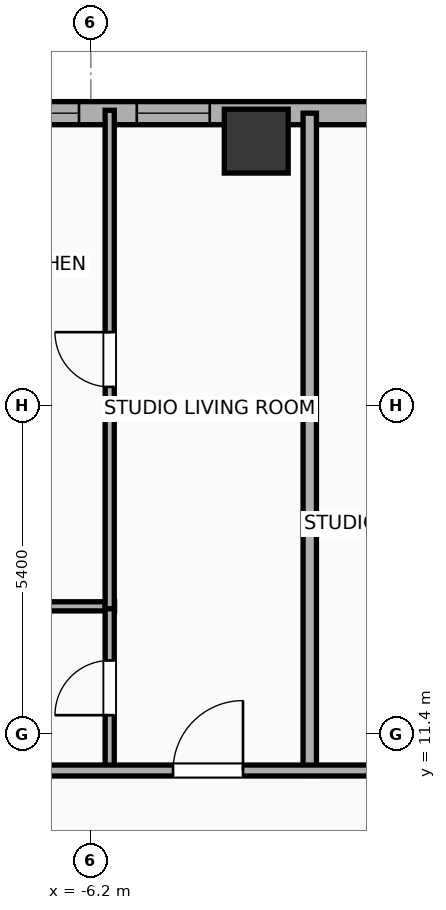
"""IFC4 building model, lengths in metres.
Left out: names, types, materials, properties, quantities, classifications, styles, units other than length and angle.
Written with IfcOpenShell. Run it as: python <this file> out.ifc"""

import sys

from ifc_helpers import new_model, si_unit, direction, frame, frame_2d, origin, origin_2d, place, context, subcontext, project, spatial, rectangle, hollow_rectangle, extrude, element, fill, save


model = new_model("IFC4")
c1 = context("Model", 3, precision=1e-05, world=origin(), true_north=direction((0.0, 1.0)))
c2 = subcontext(c1, "Body", "Model", "MODEL_VIEW")
j1 = project(units=[si_unit("LENGTHUNIT", "METRE"), si_unit("PLANEANGLEUNIT", "RADIAN")], contexts=[c1])
p1 = place(None, origin())
s1 = spatial("IfcSite", under=j1, at=p1, CompositionType="ELEMENT")
p2 = place(p1, origin())
s2 = spatial("IfcBuilding", under=s1, at=p2, CompositionType="ELEMENT")
p3 = place(p2, frame((0.0, 0.0, 132.6)))
s3 = spatial("IfcBuildingStorey", under=s2, at=p3, CompositionType="ELEMENT", Elevation=132.6)
p4 = place(p3, frame((-3.48, 21.15, 0.0), z_axis=(0.0, 0.0, 1.0), x_axis=(1.0, 0.0, 0.0)))
e1 = element("IfcColumn", 1, at=p4, inside=s3, PredefinedType="COLUMN", context=c2, shape_type="SweptSolid", body=[
    extrude(hollow_rectangle(XDim=1.05, YDim=1.05, WallThickness=0.036, at=origin_2d()), origin(), (0.0, 0.0, 1.0), 3.9),
])
p5 = place(p3, frame((-25.381, 21.61, 0.0), z_axis=(0.0, 0.0, 1.0), x_axis=(1.0, 0.0, 0.0)))
e2 = element("IfcWall", 2, at=p5, inside=s3, PredefinedType="ELEMENTEDWALL", context=c2, shape_type="SweptSolid", body=[
    extrude(rectangle(XDim=54.763, YDim=0.38, at=frame_2d((27.381, 0.0))), origin(), (0.0, 0.0, 1.0), 3.65),
])
p6 = place(p5, frame((5.645, 0.0, 0.75)))
e3 = element("IfcOpeningElement", 3, at=p6, cuts=e2, PredefinedType="OPENING", context=c2, shape_type="SweptSolid", body=[
    extrude(rectangle(XDim=2.4, YDim=2.1, at=frame_2d((1.2, 1.05))), frame((0.0, 0.2, 0.0), z_axis=(0.0, -1.0, 0.0), x_axis=(1.0, 0.0, 0.0)), (0.0, 0.0, 1.0), 0.4),
])
p7 = place(p5, frame((45.067, 0.0, 0.75)))
e4 = element("IfcOpeningElement", 4, at=p7, cuts=e2, PredefinedType="OPENING", context=c2, shape_type="SweptSolid", body=[
    extrude(rectangle(XDim=2.4, YDim=2.1, at=frame_2d((1.2, 1.05))), frame((0.0, 0.2, 0.0), z_axis=(0.0, -1.0, 0.0), x_axis=(1.0, 0.0, 0.0)), (0.0, 0.0, 1.0), 0.4),
])
p8 = place(p5, frame((1.831, 0.0, 0.75)))
e5 = element("IfcOpeningElement", 5, at=p8, cuts=e2, PredefinedType="OPENING", context=c2, shape_type="SweptSolid", body=[
    extrude(rectangle(XDim=1.2, YDim=2.05, at=frame_2d((0.6, 1.025))), frame((0.0, 0.2, 0.0), z_axis=(0.0, -1.0, 0.0), x_axis=(1.0, 0.0, 0.0)), (0.0, 0.0, 1.0), 0.4),
])
p9 = place(p5, frame((8.996, 0.0, 0.75)))
e6 = element("IfcOpeningElement", 6, at=p9, cuts=e2, PredefinedType="OPENING", context=c2, shape_type="SweptSolid", body=[
    extrude(rectangle(XDim=1.2, YDim=2.05, at=frame_2d((0.6, 1.025))), frame((0.0, 0.2, 0.0), z_axis=(0.0, -1.0, 0.0), x_axis=(1.0, 0.0, 0.0)), (0.0, 0.0, 1.0), 0.4),
])
p10 = place(p5, frame((15.102, 0.0, 0.75)))
e7 = element("IfcOpeningElement", 7, at=p10, cuts=e2, PredefinedType="OPENING", context=c2, shape_type="SweptSolid", body=[
    extrude(rectangle(XDim=1.2, YDim=2.05, at=frame_2d((0.6, 1.025))), frame((0.0, 0.2, 0.0), z_axis=(0.0, -1.0, 0.0), x_axis=(1.0, 0.0, 0.0)), (0.0, 0.0, 1.0), 0.4),
])
p11 = place(p5, frame((12.352, 0.0, 0.75)))
e8 = element("IfcOpeningElement", 8, at=p11, cuts=e2, PredefinedType="OPENING", context=c2, shape_type="SweptSolid", body=[
    extrude(rectangle(XDim=1.2, YDim=2.05, at=frame_2d((0.6, 1.025))), frame((0.0, 0.2, 0.0), z_axis=(0.0, -1.0, 0.0), x_axis=(1.0, 0.0, 0.0)), (0.0, 0.0, 1.0), 0.4),
])
p12 = place(p5, frame((19.936, 0.0, 0.75)))
e9 = element("IfcOpeningElement", 9, at=p12, cuts=e2, PredefinedType="OPENING", context=c2, shape_type="SweptSolid", body=[
    extrude(rectangle(XDim=1.2, YDim=2.05, at=frame_2d((0.6, 1.025))), frame((0.0, 0.2, 0.0), z_axis=(0.0, -1.0, 0.0), x_axis=(1.0, 0.0, 0.0)), (0.0, 0.0, 1.0), 0.4),
])
p13 = place(p5, frame((17.786, 0.0, 0.75)))
e10 = element("IfcOpeningElement", 10, at=p13, cuts=e2, PredefinedType="OPENING", context=c2, shape_type="SweptSolid", body=[
    extrude(rectangle(XDim=1.2, YDim=2.05, at=frame_2d((0.6, 1.025))), frame((0.0, 0.2, 0.0), z_axis=(0.0, -1.0, 0.0), x_axis=(1.0, 0.0, 0.0)), (0.0, 0.0, 1.0), 0.4),
])
p14 = place(p5, frame((23.826, 0.0, 0.75)))
e11 = element("IfcOpeningElement", 11, at=p14, cuts=e2, PredefinedType="OPENING", context=c2, shape_type="SweptSolid", body=[
    extrude(rectangle(XDim=1.2, YDim=2.05, at=frame_2d((0.6, 1.025))), frame((0.0, 0.2, 0.0), z_axis=(0.0, -1.0, 0.0), x_axis=(1.0, 0.0, 0.0)), (0.0, 0.0, 1.0), 0.4),
])
p15 = place(p5, frame((26.576, 0.0, 0.75)))
e12 = element("IfcOpeningElement", 12, at=p15, cuts=e2, PredefinedType="OPENING", context=c2, shape_type="SweptSolid", body=[
    extrude(rectangle(XDim=1.2, YDim=2.05, at=frame_2d((0.6, 1.025))), frame((0.0, 0.2, 0.0), z_axis=(0.0, -1.0, 0.0), x_axis=(1.0, 0.0, 0.0)), (0.0, 0.0, 1.0), 0.4),
])
p16 = place(p5, frame((30.431, 0.0, 0.75)))
e13 = element("IfcOpeningElement", 13, at=p16, cuts=e2, PredefinedType="OPENING", context=c2, shape_type="SweptSolid", body=[
    extrude(rectangle(XDim=1.2, YDim=2.05, at=frame_2d((0.6, 1.025))), frame((0.0, 0.2, 0.0), z_axis=(0.0, -1.0, 0.0), x_axis=(1.0, 0.0, 0.0)), (0.0, 0.0, 1.0), 0.4),
])
p17 = place(p5, frame((38.581, 0.0, 0.75)))
e14 = element("IfcOpeningElement", 14, at=p17, cuts=e2, PredefinedType="OPENING", context=c2, shape_type="SweptSolid", body=[
    extrude(rectangle(XDim=1.2, YDim=2.05, at=frame_2d((0.6, 1.025))), frame((0.0, 0.2, 0.0), z_axis=(0.0, -1.0, 0.0), x_axis=(1.0, 0.0, 0.0)), (0.0, 0.0, 1.0), 0.4),
])
p18 = place(p5, frame((34.786, 0.0, 0.75)))
e15 = element("IfcOpeningElement", 15, at=p18, cuts=e2, PredefinedType="OPENING", context=c2, shape_type="SweptSolid", body=[
    extrude(rectangle(XDim=1.2, YDim=2.05, at=frame_2d((0.6, 1.025))), frame((0.0, 0.2, 0.0), z_axis=(0.0, -1.0, 0.0), x_axis=(1.0, 0.0, 0.0)), (0.0, 0.0, 1.0), 0.4),
])
p19 = place(p5, frame((41.876, 0.0, 0.75)))
e16 = element("IfcOpeningElement", 16, at=p19, cuts=e2, PredefinedType="OPENING", context=c2, shape_type="SweptSolid", body=[
    extrude(rectangle(XDim=1.2, YDim=2.05, at=frame_2d((0.6, 1.025))), frame((0.0, 0.2, 0.0), z_axis=(0.0, -1.0, 0.0), x_axis=(1.0, 0.0, 0.0)), (0.0, 0.0, 1.0), 0.4),
])
p20 = place(p5, frame((49.385, 0.0, 0.75)))
e17 = element("IfcOpeningElement", 17, at=p20, cuts=e2, PredefinedType="OPENING", context=c2, shape_type="SweptSolid", body=[
    extrude(rectangle(XDim=1.2, YDim=2.05, at=frame_2d((0.6, 1.025))), frame((0.0, 0.2, 0.0), z_axis=(0.0, -1.0, 0.0), x_axis=(1.0, 0.0, 0.0)), (0.0, 0.0, 1.0), 0.4),
])
p21 = place(p5, frame((52.181, 0.0, 0.75)))
e18 = element("IfcOpeningElement", 18, at=p21, cuts=e2, PredefinedType="OPENING", context=c2, shape_type="SweptSolid", body=[
    extrude(rectangle(XDim=1.2, YDim=2.05, at=frame_2d((0.6, 1.025))), frame((0.0, 0.2, 0.0), z_axis=(0.0, -1.0, 0.0), x_axis=(1.0, 0.0, 0.0)), (0.0, 0.0, 1.0), 0.4),
])
p22 = place(p3, frame((-8.36, 13.5, 0.0), z_axis=(0.0, 0.0, 1.0), x_axis=(1.0, 0.0, 0.0)))
e19 = element("IfcWall", 19, at=p22, inside=s3, PredefinedType="PLUMBINGWALL", context=c2, shape_type="SweptSolid", body=[
    extrude(rectangle(XDim=2.55, YDim=0.15, at=frame_2d((1.275, 0.0))), origin(), (0.0, 0.0, 1.0), 3.65),
])
p23 = place(p3, frame((-5.89, 10.78, 0.0), z_axis=(0.0, 0.0, 1.0), x_axis=(0.0, 1.0, 0.0)))
e20 = element("IfcWall", 20, at=p23, inside=s3, PredefinedType="PLUMBINGWALL", context=c2, shape_type="SweptSolid", body=[
    extrude(rectangle(XDim=2.76, YDim=0.15, at=frame_2d((1.38, 0.0))), origin(), (0.0, 0.0, 1.0), 3.65),
])
p24 = place(p23, frame((0.93, 0.0, 0.0)))
e21 = element("IfcOpeningElement", 21, at=p24, cuts=e20, PredefinedType="OPENING", context=c2, shape_type="SweptSolid", body=[
    extrude(rectangle(XDim=0.9, YDim=2.05, at=frame_2d((0.45, 1.025))), frame((0.0, 0.085, 0.0), z_axis=(0.0, -1.0, 0.0), x_axis=(1.0, 0.0, 0.0)), (0.0, 0.0, 1.0), 0.17),
])
p25 = place(p3, frame((-5.89, 13.46, 0.0), z_axis=(0.0, 0.0, 1.0), x_axis=(0.0, 1.0, 0.0)))
e22 = element("IfcWall", 22, at=p25, inside=s3, PredefinedType="PLUMBINGWALL", context=c2, shape_type="SweptSolid", body=[
    extrude(rectangle(XDim=8.198, YDim=0.15, at=frame_2d((4.099, 0.0))), origin(), (0.0, 0.0, 1.0), 3.65),
])
p26 = place(p25, frame((3.649, 0.0, 0.0)))
e23 = element("IfcOpeningElement", 23, at=p26, cuts=e22, PredefinedType="OPENING", context=c2, shape_type="SweptSolid", body=[
    extrude(rectangle(XDim=0.9, YDim=2.05, at=frame_2d((0.45, 1.025))), frame((0.0, 0.085, 0.0), z_axis=(0.0, -1.0, 0.0), x_axis=(1.0, 0.0, 0.0)), (0.0, 0.0, 1.0), 0.17),
])
p27 = place(p3, frame((-2.6, 10.72, 0.0), z_axis=(0.0, 0.0, 1.0), x_axis=(0.0, 1.0, 0.0)))
e24 = element("IfcWall", 24, at=p27, inside=s3, PredefinedType="PARTITIONING", context=c2, shape_type="SweptSolid", body=[
    extrude(rectangle(XDim=10.89, YDim=0.22, at=frame_2d((5.445, 0.0))), origin(), (0.0, 0.0, 1.0), 3.65),
])
p28 = place(p3, frame((-29.21, 10.8, 0.0), z_axis=(0.0, 0.0, 1.0), x_axis=(1.0, 0.0, 0.0)))
e25 = element("IfcWall", 25, at=p28, inside=s3, PredefinedType="PARTITIONING", context=c2, shape_type="SweptSolid", body=[
    extrude(rectangle(XDim=62.42, YDim=0.18, at=frame_2d((31.21, 0.0))), origin(), (0.0, 0.0, 1.0), 3.65),
])
p29 = place(p28, frame((3.457, 0.0, 0.0)))
e26 = element("IfcOpeningElement", 26, at=p29, cuts=e25, PredefinedType="OPENING", context=c2, shape_type="SweptSolid", body=[
    extrude(rectangle(XDim=1.15, YDim=2.05, at=frame_2d((0.575, 1.025))), frame((0.0, 0.1, 0.0), z_axis=(0.0, -1.0, 0.0), x_axis=(1.0, 0.0, 0.0)), (0.0, 0.0, 1.0), 0.2),
])
p30 = place(p28, frame((11.297, 0.0, 0.0)))
e27 = element("IfcOpeningElement", 27, at=p30, cuts=e25, PredefinedType="OPENING", context=c2, shape_type="SweptSolid", body=[
    extrude(rectangle(XDim=1.15, YDim=2.05, at=frame_2d((0.575, 1.025))), frame((0.0, 0.1, 0.0), z_axis=(0.0, -1.0, 0.0), x_axis=(1.0, 0.0, 0.0)), (0.0, 0.0, 1.0), 0.2),
])
p31 = place(p28, frame((18.925, 0.0, 0.0)))
e28 = element("IfcOpeningElement", 28, at=p31, cuts=e25, PredefinedType="OPENING", context=c2, shape_type="SweptSolid", body=[
    extrude(rectangle(XDim=1.15, YDim=2.05, at=frame_2d((0.575, 1.025))), frame((0.0, 0.1, 0.0), z_axis=(0.0, -1.0, 0.0), x_axis=(1.0, 0.0, 0.0)), (0.0, 0.0, 1.0), 0.2),
])
p32 = place(p28, frame((24.362, 0.0, 0.0)))
e29 = element("IfcOpeningElement", 29, at=p32, cuts=e25, PredefinedType="OPENING", context=c2, shape_type="SweptSolid", body=[
    extrude(rectangle(XDim=1.15, YDim=2.05, at=frame_2d((0.575, 1.025))), frame((0.0, 0.1, 0.0), z_axis=(0.0, -1.0, 0.0), x_axis=(1.0, 0.0, 0.0)), (0.0, 0.0, 1.0), 0.2),
])
p33 = place(p28, frame((27.708, 0.0, 0.0)))
e30 = element("IfcOpeningElement", 30, at=p33, cuts=e25, PredefinedType="OPENING", context=c2, shape_type="SweptSolid", body=[
    extrude(rectangle(XDim=1.15, YDim=2.05, at=frame_2d((0.575, 1.025))), frame((0.0, 0.1, 0.0), z_axis=(0.0, -1.0, 0.0), x_axis=(1.0, 0.0, 0.0)), (0.0, 0.0, 1.0), 0.2),
])
p34 = place(p28, frame((34.618, 0.0, 0.0)))
e31 = element("IfcOpeningElement", 31, at=p34, cuts=e25, PredefinedType="OPENING", context=c2, shape_type="SweptSolid", body=[
    extrude(rectangle(XDim=0.9, YDim=2.05, at=frame_2d((0.45, 1.025))), frame((0.0, 0.1, 0.0), z_axis=(0.0, -1.0, 0.0), x_axis=(1.0, 0.0, 0.0)), (0.0, 0.0, 1.0), 0.2),
])
p35 = place(p28, frame((43.106, 0.0, 0.0)))
e32 = element("IfcOpeningElement", 32, at=p35, cuts=e25, PredefinedType="OPENING", context=c2, shape_type="SweptSolid", body=[
    extrude(rectangle(XDim=1.15, YDim=2.05, at=frame_2d((0.575, 1.025))), frame((0.0, 0.1, 0.0), z_axis=(0.0, -1.0, 0.0), x_axis=(1.0, 0.0, 0.0)), (0.0, 0.0, 1.0), 0.2),
])
p36 = place(p28, frame((51.777, 0.0, 0.0)))
e33 = element("IfcOpeningElement", 33, at=p36, cuts=e25, PredefinedType="OPENING", context=c2, shape_type="SweptSolid", body=[
    extrude(rectangle(XDim=0.9, YDim=2.05, at=frame_2d((0.45, 1.025))), frame((0.0, 0.1, 0.0), z_axis=(0.0, -1.0, 0.0), x_axis=(1.0, 0.0, 0.0)), (0.0, 0.0, 1.0), 0.2),
])
p37 = place(p28, frame((58.718, 0.0, 0.0)))
e34 = element("IfcOpeningElement", 34, at=p37, cuts=e25, PredefinedType="OPENING", context=c2, shape_type="SweptSolid", body=[
    extrude(rectangle(XDim=0.9, YDim=2.05, at=frame_2d((0.45, 1.025))), frame((0.0, 0.1, 0.0), z_axis=(0.0, -1.0, 0.0), x_axis=(1.0, 0.0, 0.0)), (0.0, 0.0, 1.0), 0.2),
])
p38 = place(p12, origin())
e35 = element("IfcWindow", 35, at=p38, inside=s3, PartitioningType="SINGLE_PANEL", PredefinedType="WINDOW", context=c2, shape_type="SweptSolid", body=[
    extrude(rectangle(XDim=1.2, YDim=2.05, at=frame_2d((0.6, 1.025))), frame((0.0, 0.03, 0.0), z_axis=(0.0, -1.0, 0.0), x_axis=(1.0, 0.0, 0.0)), (0.0, 0.0, 1.0), 0.06),
])
fill(e9, e35)
p39 = place(p13, origin())
e36 = element("IfcWindow", 36, at=p39, inside=s3, PartitioningType="SINGLE_PANEL", PredefinedType="WINDOW", context=c2, shape_type="SweptSolid", body=[
    extrude(rectangle(XDim=1.2, YDim=2.05, at=frame_2d((0.6, 1.025))), frame((0.0, 0.03, 0.0), z_axis=(0.0, -1.0, 0.0), x_axis=(1.0, 0.0, 0.0)), (0.0, 0.0, 1.0), 0.06),
])
fill(e10, e36)
p40 = place(p24, origin())
e37 = element("IfcDoor", 37, at=p40, inside=s3, OperationType="SINGLE_SWING_LEFT", PredefinedType="DOOR", context=c2, shape_type="SweptSolid", body=[
    extrude(rectangle(XDim=0.9, YDim=2.05, at=frame_2d((0.45, 1.025))), frame((0.0, 0.025, 0.0), z_axis=(0.0, -1.0, 0.0), x_axis=(1.0, 0.0, 0.0)), (0.0, 0.0, 1.0), 0.05),
])
fill(e21, e37)
p41 = place(p26, origin())
e38 = element("IfcDoor", 38, at=p41, inside=s3, OperationType="SINGLE_SWING_RIGHT", PredefinedType="DOOR", context=c2, shape_type="SweptSolid", body=[
    extrude(rectangle(XDim=0.9, YDim=2.05, at=frame_2d((0.45, 1.025))), frame((0.0, 0.025, 0.0), z_axis=(0.0, -1.0, 0.0), x_axis=(1.0, 0.0, 0.0)), (0.0, 0.0, 1.0), 0.05),
])
fill(e23, e38)
p42 = place(p32, origin())
e39 = element("IfcDoor", 39, at=p42, inside=s3, OperationType="SINGLE_SWING_RIGHT", PredefinedType="DOOR", context=c2, shape_type="SweptSolid", body=[
    extrude(rectangle(XDim=1.15, YDim=2.05, at=frame_2d((0.575, 1.025))), frame((0.0, 0.025, 0.0), z_axis=(0.0, -1.0, 0.0), x_axis=(1.0, 0.0, 0.0)), (0.0, 0.0, 1.0), 0.05),
])
fill(e29, e39)
save(model, sys.argv[1])
